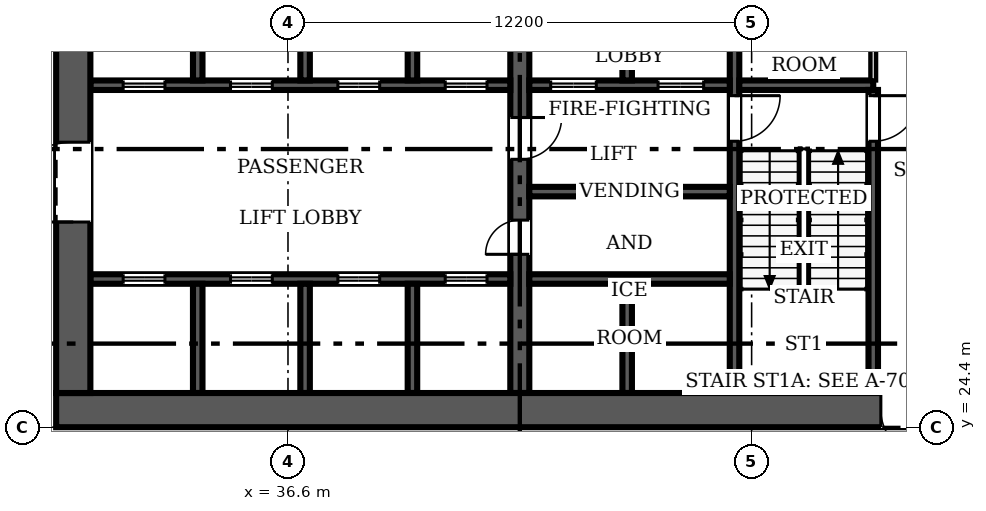
"""IFC4 building model, lengths in metres.
Left out: names, types, materials, properties, quantities, classifications, styles, units other than length and angle.
Written with IfcOpenShell. Run it as: python <this file> out.ifc"""

import sys

from ifc_helpers import new_model, si_unit, direction, frame, frame_2d, origin, place, context, subcontext, project, spatial, rectangle, extrude, source, transform, mapped, element, fill, save


model = new_model("IFC4")
c1 = context("Model", 3, precision=1e-05, world=origin(), true_north=direction((0.0, 1.0)))
c2 = subcontext(c1, "Body", "Model", "MODEL_VIEW")
j1 = project(units=[si_unit("LENGTHUNIT", "METRE"), si_unit("PLANEANGLEUNIT", "RADIAN")], contexts=[c1])
p1 = place(None, origin())
s1 = spatial("IfcSite", under=j1, at=p1, CompositionType="ELEMENT")
p2 = place(p1, origin())
s2 = spatial("IfcBuilding", under=s1, at=p2, CompositionType="ELEMENT")
p3 = place(p2, frame((0.0, 0.0, 7.2)))
s3 = spatial("IfcBuildingStorey", under=s2, at=p3, CompositionType="ELEMENT", Elevation=7.2)
p4 = place(p3, frame((54.9, 24.85, 0.0), z_axis=(0.0, 0.0, 1.0), x_axis=(-1.0, 0.0, 0.0)))
e1 = element("IfcWall", 1, at=p4, inside=s3, PredefinedType="SHEAR", context=c2, shape_type="SweptSolid", body=[
    extrude(rectangle(XDim=24.4, YDim=0.9, at=frame_2d((12.2, 0.0))), origin(), (0.0, 0.0, 1.0), 4.8),
])
m1 = source(origin(), c2, "Body", "SweptSolid", [
    extrude(rectangle(XDim=1.2, YDim=2.1, at=frame_2d((0.6, 1.05))), frame((0.0, 0.46, 0.0), z_axis=(0.0, -1.0, 0.0), x_axis=(1.0, 0.0, 0.0)), (0.0, 0.0, 1.0), 0.92),
])
p5 = place(p4, frame((1.5, 0.0, 0.0)))
e2 = element("IfcOpeningElement", 2, at=p5, cuts=e1, PredefinedType="OPENING", context=c2, shape_type="MappedRepresentation", body=[
    mapped(m1, transform((0.0, 0.0, 0.0), scale=1.0)),
])
p6 = place(p3, frame((30.95, 25.3, 0.0), z_axis=(0.0, 0.0, 1.0), x_axis=(0.0, 1.0, 0.0)))
e3 = element("IfcWall", 3, at=p6, inside=s3, PredefinedType="SHEAR", context=c2, shape_type="SweptSolid", body=[
    extrude(rectangle(XDim=22.6, YDim=0.9, at=frame_2d((11.3, 0.0))), origin(), (0.0, 0.0, 1.0), 4.8),
])
m2 = source(origin(), c2, "Body", "SweptSolid", [
    extrude(rectangle(XDim=2.1, YDim=2.4, at=frame_2d((1.05, 1.2))), frame((0.0, 0.46, 0.0), z_axis=(0.0, -1.0, 0.0), x_axis=(1.0, 0.0, 0.0)), (0.0, 0.0, 1.0), 0.92),
])
p7 = place(p6, frame((4.5, 0.0, 0.0)))
e4 = element("IfcOpeningElement", 4, at=p7, cuts=e3, PredefinedType="OPENING", context=c2, shape_type="MappedRepresentation", body=[
    mapped(m2, transform((0.0, 0.0, 0.0), scale=1.0)),
])
p8 = place(p6, frame((16.0, 0.0, 0.0)))
e5 = element("IfcOpeningElement", 5, at=p8, cuts=e3, PredefinedType="OPENING", context=c2, shape_type="MappedRepresentation", body=[
    mapped(m2, transform((0.0, 0.0, 0.0), scale=1.0)),
])
p9 = place(p3, frame((42.7, 36.35, 0.0), z_axis=(0.0, 0.0, 1.0), x_axis=(0.0, -1.0, 0.0)))
e6 = element("IfcWall", 6, at=p9, inside=s3, PredefinedType="SHEAR", context=c2, shape_type="SweptSolid", body=[
    extrude(rectangle(XDim=11.05, YDim=0.5, at=frame_2d((5.525, 0.0))), origin(), (0.0, 0.0, 1.0), 4.8),
])
m3 = source(origin(), c2, "Body", "SweptSolid", [
    extrude(rectangle(XDim=0.9, YDim=2.1, at=frame_2d((0.45, 1.05))), frame((0.0, 0.26, 0.0), z_axis=(0.0, -1.0, 0.0), x_axis=(1.0, 0.0, 0.0)), (0.0, 0.0, 1.0), 0.52),
])
p10 = place(p9, frame((6.5, 0.0, 0.0)))
e7 = element("IfcOpeningElement", 7, at=p10, cuts=e6, PredefinedType="OPENING", context=c2, shape_type="MappedRepresentation", body=[
    mapped(m3, transform((0.0, 0.0, 0.0), scale=1.0)),
])
m4 = source(origin(), c2, "Body", "SweptSolid", [
    extrude(rectangle(XDim=1.1, YDim=2.1, at=frame_2d((0.55, 1.05))), frame((0.0, 0.26, 0.0), z_axis=(0.0, -1.0, 0.0), x_axis=(1.0, 0.0, 0.0)), (0.0, 0.0, 1.0), 0.52),
])
p11 = place(p9, frame((3.8, 0.0, 0.0)))
e8 = element("IfcOpeningElement", 8, at=p11, cuts=e6, PredefinedType="OPENING", context=c2, shape_type="MappedRepresentation", body=[
    mapped(m4, transform((0.0, 0.0, 0.0), scale=1.0)),
])
p12 = place(p3, frame((48.35, 36.35, 0.0), z_axis=(0.0, 0.0, 1.0), x_axis=(0.0, -1.0, 0.0)))
e9 = element("IfcWall", 9, at=p12, inside=s3, PredefinedType="SOLIDWALL", context=c2, shape_type="SweptSolid", body=[
    extrude(rectangle(XDim=11.05, YDim=0.25, at=frame_2d((5.525, 0.0))), origin(), (0.0, 0.0, 1.0), 4.8),
])
m5 = source(origin(), c2, "Body", "SweptSolid", [
    extrude(rectangle(XDim=1.2, YDim=2.1, at=frame_2d((0.6, 1.05))), frame((0.0, 0.135, 0.0), z_axis=(0.0, -1.0, 0.0), x_axis=(1.0, 0.0, 0.0)), (0.0, 0.0, 1.0), 0.27),
])
p13 = place(p12, frame((3.225, 0.0, 0.0)))
e10 = element("IfcOpeningElement", 10, at=p13, cuts=e9, PredefinedType="OPENING", context=c2, shape_type="MappedRepresentation", body=[
    mapped(m5, transform((0.0, 0.0, 0.0), scale=1.0)),
])
p14 = place(p3, frame((42.45, 33.4, 0.0), z_axis=(0.0, 0.0, 1.0), x_axis=(-1.0, 0.0, 0.0)))
e11 = element("IfcWall", 11, at=p14, inside=s3, PredefinedType="SOLIDWALL", context=c2, shape_type="SweptSolid", body=[
    extrude(rectangle(XDim=11.05, YDim=0.25, at=frame_2d((5.525, 0.0))), origin(), (0.0, 0.0, 1.0), 4.8),
])
m6 = source(origin(), c2, "Body", "SweptSolid", [
    extrude(rectangle(XDim=1.1, YDim=2.1, at=frame_2d((0.55, 1.05))), frame((0.0, 0.135, 0.0), z_axis=(0.0, -1.0, 0.0), x_axis=(1.0, 0.0, 0.0)), (0.0, 0.0, 1.0), 0.27),
])
p15 = place(p14, frame((9.087, 0.0, 0.0)))
e12 = element("IfcOpeningElement", 12, at=p15, cuts=e11, PredefinedType="OPENING", context=c2, shape_type="MappedRepresentation", body=[
    mapped(m6, transform((0.0, 0.0, 0.0), scale=1.0)),
])
p16 = place(p14, frame((6.262, 0.0, 0.0)))
e13 = element("IfcOpeningElement", 13, at=p16, cuts=e11, PredefinedType="OPENING", context=c2, shape_type="MappedRepresentation", body=[
    mapped(m6, transform((0.0, 0.0, 0.0), scale=1.0)),
])
p17 = place(p14, frame((3.438, 0.0, 0.0)))
e14 = element("IfcOpeningElement", 14, at=p17, cuts=e11, PredefinedType="OPENING", context=c2, shape_type="MappedRepresentation", body=[
    mapped(m6, transform((0.0, 0.0, 0.0), scale=1.0)),
])
p18 = place(p14, frame((0.613, 0.0, 0.0)))
e15 = element("IfcOpeningElement", 15, at=p18, cuts=e11, PredefinedType="OPENING", context=c2, shape_type="MappedRepresentation", body=[
    mapped(m6, transform((0.0, 0.0, 0.0), scale=1.0)),
])
p19 = place(p3, frame((48.225, 33.4, 0.0), z_axis=(0.0, 0.0, 1.0), x_axis=(-1.0, 0.0, 0.0)))
e16 = element("IfcWall", 16, at=p19, inside=s3, PredefinedType="SOLIDWALL", context=c2, shape_type="SweptSolid", body=[
    extrude(rectangle(XDim=5.275, YDim=0.25, at=frame_2d((2.638, 0.0))), origin(), (0.0, 0.0, 1.0), 4.8),
])
p20 = place(p19, frame((3.512, 0.0, 0.0)))
e17 = element("IfcOpeningElement", 17, at=p20, cuts=e16, PredefinedType="OPENING", context=c2, shape_type="MappedRepresentation", body=[
    mapped(m5, transform((0.0, 0.0, 0.0), scale=1.0)),
])
p21 = place(p19, frame((0.688, 0.0, 0.0)))
e18 = element("IfcOpeningElement", 18, at=p21, cuts=e16, PredefinedType="OPENING", context=c2, shape_type="MappedRepresentation", body=[
    mapped(m5, transform((0.0, 0.0, 0.0), scale=1.0)),
])
p22 = place(p3, frame((48.475, 33.4, 0.0), z_axis=(0.0, 0.0, 1.0), x_axis=(1.0, 0.0, 0.0)))
e19 = element("IfcWall", 19, at=p22, inside=s3, PredefinedType="SOLIDWALL", context=c2, shape_type="SweptSolid", body=[
    extrude(rectangle(XDim=3.525, YDim=0.25, at=frame_2d((1.762, 0.0))), origin(), (0.0, 0.0, 1.0), 4.8),
])
p23 = place(p3, frame((31.4, 28.3, 0.0), z_axis=(0.0, 0.0, 1.0), x_axis=(1.0, 0.0, 0.0)))
e20 = element("IfcWall", 20, at=p23, inside=s3, PredefinedType="SOLIDWALL", context=c2, shape_type="SweptSolid", body=[
    extrude(rectangle(XDim=11.05, YDim=0.25, at=frame_2d((5.525, 0.0))), origin(), (0.0, 0.0, 1.0), 4.8),
])
p24 = place(p23, frame((0.863, 0.0, 0.0)))
e21 = element("IfcOpeningElement", 21, at=p24, cuts=e20, PredefinedType="OPENING", context=c2, shape_type="MappedRepresentation", body=[
    mapped(m6, transform((0.0, 0.0, 0.0), scale=1.0)),
])
p25 = place(p23, frame((3.688, 0.0, 0.0)))
e22 = element("IfcOpeningElement", 22, at=p25, cuts=e20, PredefinedType="OPENING", context=c2, shape_type="MappedRepresentation", body=[
    mapped(m6, transform((0.0, 0.0, 0.0), scale=1.0)),
])
p26 = place(p23, frame((6.512, 0.0, 0.0)))
e23 = element("IfcOpeningElement", 23, at=p26, cuts=e20, PredefinedType="OPENING", context=c2, shape_type="MappedRepresentation", body=[
    mapped(m6, transform((0.0, 0.0, 0.0), scale=1.0)),
])
p27 = place(p23, frame((9.337, 0.0, 0.0)))
e24 = element("IfcOpeningElement", 24, at=p27, cuts=e20, PredefinedType="OPENING", context=c2, shape_type="MappedRepresentation", body=[
    mapped(m6, transform((0.0, 0.0, 0.0), scale=1.0)),
])
p28 = place(p3, frame((42.95, 28.3, 0.0), z_axis=(0.0, 0.0, 1.0), x_axis=(1.0, 0.0, 0.0)))
e25 = element("IfcWall", 25, at=p28, inside=s3, PredefinedType="SOLIDWALL", context=c2, shape_type="SweptSolid", body=[
    extrude(rectangle(XDim=5.275, YDim=0.25, at=frame_2d((2.638, 0.0))), origin(), (0.0, 0.0, 1.0), 4.8),
])
p29 = place(p3, frame((52.0, 25.3, 0.0), z_axis=(0.0, 0.0, 1.0), x_axis=(0.0, 1.0, 0.0)))
e26 = element("IfcWall", 26, at=p29, inside=s3, PredefinedType="SOLIDWALL", context=c2, shape_type="SweptSolid", body=[
    extrude(rectangle(XDim=7.975, YDim=0.25, at=frame_2d((3.987, 0.0))), origin(), (0.0, 0.0, 1.0), 4.8),
])
p30 = place(p29, frame((6.625, 0.0, 0.0)))
e27 = element("IfcOpeningElement", 27, at=p30, cuts=e26, PredefinedType="OPENING", context=c2, shape_type="MappedRepresentation", body=[
    mapped(m5, transform((0.0, 0.0, 0.0), scale=1.0)),
])
p31 = place(p3, frame((45.525, 33.525, 0.0), z_axis=(0.0, 0.0, 1.0), x_axis=(0.0, 1.0, 0.0)))
e28 = element("IfcWall", 28, at=p31, inside=s3, PredefinedType="SOLIDWALL", context=c2, shape_type="SweptSolid", body=[
    extrude(rectangle(XDim=2.825, YDim=0.25, at=frame_2d((1.413, 0.0))), origin(), (0.0, 0.0, 1.0), 4.8),
])
p32 = place(p3, frame((42.95, 30.6, 0.0), z_axis=(0.0, 0.0, 1.0), x_axis=(1.0, 0.0, 0.0)))
e29 = element("IfcWall", 29, at=p32, inside=s3, PredefinedType="SOLIDWALL", context=c2, shape_type="SweptSolid", body=[
    extrude(rectangle(XDim=5.275, YDim=0.25, at=frame_2d((2.638, 0.0))), origin(), (0.0, 0.0, 1.0), 4.8),
])
for number, where, z_axis, x_axis in (
    (30, (34.225, 33.525, 0.0), (0.0, 0.0, 1.0), (0.0, 1.0, 0.0)),
    (31, (37.05, 33.525, 0.0), (0.0, 0.0, 1.0), (0.0, 1.0, 0.0)),
    (32, (39.875, 33.525, 0.0), (0.0, 0.0, 1.0), (0.0, 1.0, 0.0)),
):
    element("IfcWall", number, at=place(p3, frame(where, z_axis=z_axis, x_axis=x_axis)), inside=s3, PredefinedType="SOLIDWALL", context=c2, shape_type="SweptSolid", body=[
        extrude(rectangle(XDim=2.825, YDim=0.25, at=frame_2d((1.413, 0.0))), origin(), (0.0, 0.0, 1.0), 4.8),
    ])
for number, where, z_axis, x_axis in (
    (33, (34.225, 25.3, 0.0), (0.0, 0.0, 1.0), (0.0, 1.0, 0.0)),
    (34, (37.05, 25.3, 0.0), (0.0, 0.0, 1.0), (0.0, 1.0, 0.0)),
    (35, (39.875, 25.3, 0.0), (0.0, 0.0, 1.0), (0.0, 1.0, 0.0)),
    (36, (45.525, 25.3, 0.0), (0.0, 0.0, 1.0), (0.0, 1.0, 0.0)),
):
    element("IfcWall", number, at=place(p3, frame(where, z_axis=z_axis, x_axis=x_axis)), inside=s3, PredefinedType="SOLIDWALL", context=c2, shape_type="SweptSolid", body=[
        extrude(rectangle(XDim=2.875, YDim=0.25, at=frame_2d((1.438, 0.0))), origin(), (0.0, 0.0, 1.0), 4.8),
    ])
p33 = place(p3, frame((52.0, 33.525, 0.0), z_axis=(0.0, 0.0, 1.0), x_axis=(0.0, 1.0, 0.0)))
e37 = element("IfcWall", 37, at=p33, inside=s3, PredefinedType="PARTITIONING", context=c2, shape_type="SweptSolid", body=[
    extrude(rectangle(XDim=6.15, YDim=0.15, at=frame_2d((3.075, 0.0))), origin(), (0.0, 0.0, 1.0), 4.55),
])
m7 = source(origin(), c2, "Body", "SweptSolid", [
    extrude(rectangle(XDim=0.9, YDim=2.1, at=frame_2d((0.45, 1.05))), frame((0.0, 0.085, 0.0), z_axis=(0.0, -1.0, 0.0), x_axis=(1.0, 0.0, 0.0)), (0.0, 0.0, 1.0), 0.17),
])
p34 = place(p33, frame((1.025, 0.0, 0.0)))
e38 = element("IfcOpeningElement", 38, at=p34, cuts=e37, PredefinedType="OPENING", context=c2, shape_type="MappedRepresentation", body=[
    mapped(m7, transform((0.0, 0.0, 0.0), scale=1.0)),
])
m8 = source(origin(), c2, "Body", "SweptSolid", [
    extrude(rectangle(XDim=1.2, YDim=2.1, at=frame_2d((0.6, 1.05))), frame((0.0, 0.025, 0.0), z_axis=(0.0, -1.0, 0.0), x_axis=(1.0, 0.0, 0.0)), (0.0, 0.0, 1.0), 0.05),
])
p35 = place(p5, origin())
e39 = element("IfcDoor", 39, at=p35, inside=s3, OperationType="SINGLE_SWING_LEFT", PredefinedType="DOOR", context=c2, shape_type="MappedRepresentation", body=[
    mapped(m8, transform((0.0, 0.0, 0.0), scale=1.0)),
])
fill(e2, e39)
m9 = source(origin(), c2, "Body", "SweptSolid", [
    extrude(rectangle(XDim=2.1, YDim=2.4, at=frame_2d((1.05, 1.2))), frame((0.0, 0.025, 0.0), z_axis=(0.0, -1.0, 0.0), x_axis=(1.0, 0.0, 0.0)), (0.0, 0.0, 1.0), 0.05),
])
p36 = place(p7, origin())
e40 = element("IfcDoor", 40, at=p36, inside=s3, OperationType="DOUBLE_DOOR_SINGLE_SWING", PredefinedType="DOOR", context=c2, shape_type="MappedRepresentation", body=[
    mapped(m9, transform((0.0, 0.0, 0.0), scale=1.0)),
])
fill(e4, e40)
m10 = source(origin(), c2, "Body", "SweptSolid", [
    extrude(rectangle(XDim=0.9, YDim=2.1, at=frame_2d((0.45, 1.05))), frame((0.0, 0.025, 0.0), z_axis=(0.0, -1.0, 0.0), x_axis=(1.0, 0.0, 0.0)), (0.0, 0.0, 1.0), 0.05),
])
p37 = place(p10, origin())
e41 = element("IfcDoor", 41, at=p37, inside=s3, OperationType="SINGLE_SWING_RIGHT", PredefinedType="DOOR", context=c2, shape_type="MappedRepresentation", body=[
    mapped(m10, transform((0.0, 0.0, 0.0), scale=1.0)),
])
fill(e7, e41)
m11 = source(origin(), c2, "Body", "SweptSolid", [
    extrude(rectangle(XDim=1.1, YDim=2.1, at=frame_2d((0.55, 1.05))), frame((0.0, 0.025, 0.0), z_axis=(0.0, -1.0, 0.0), x_axis=(1.0, 0.0, 0.0)), (0.0, 0.0, 1.0), 0.05),
])
p38 = place(p11, origin())
e42 = element("IfcDoor", 42, at=p38, inside=s3, OperationType="SINGLE_SWING_LEFT", PredefinedType="DOOR", context=c2, shape_type="MappedRepresentation", body=[
    mapped(m11, transform((0.0, 0.0, 0.0), scale=1.0)),
])
fill(e8, e42)
p39 = place(p13, origin())
e43 = element("IfcDoor", 43, at=p39, inside=s3, OperationType="SINGLE_SWING_LEFT", PredefinedType="DOOR", context=c2, shape_type="MappedRepresentation", body=[
    mapped(m8, transform((0.0, 0.0, 0.0), scale=1.0)),
])
fill(e10, e43)
p40 = place(p15, origin())
e44 = element("IfcDoor", 44, at=p40, inside=s3, OperationType="DOUBLE_DOOR_SLIDING", PredefinedType="DOOR", context=c2, shape_type="MappedRepresentation", body=[
    mapped(m11, transform((0.0, 0.0, 0.0), scale=1.0)),
])
fill(e12, e44)
p41 = place(p16, origin())
e45 = element("IfcDoor", 45, at=p41, inside=s3, OperationType="DOUBLE_DOOR_SLIDING", PredefinedType="DOOR", context=c2, shape_type="MappedRepresentation", body=[
    mapped(m11, transform((0.0, 0.0, 0.0), scale=1.0)),
])
fill(e13, e45)
p42 = place(p17, origin())
e46 = element("IfcDoor", 46, at=p42, inside=s3, OperationType="DOUBLE_DOOR_SLIDING", PredefinedType="DOOR", context=c2, shape_type="MappedRepresentation", body=[
    mapped(m11, transform((0.0, 0.0, 0.0), scale=1.0)),
])
fill(e14, e46)
p43 = place(p18, origin())
e47 = element("IfcDoor", 47, at=p43, inside=s3, OperationType="DOUBLE_DOOR_SLIDING", PredefinedType="DOOR", context=c2, shape_type="MappedRepresentation", body=[
    mapped(m11, transform((0.0, 0.0, 0.0), scale=1.0)),
])
fill(e15, e47)
p44 = place(p20, origin())
e48 = element("IfcDoor", 48, at=p44, inside=s3, OperationType="DOUBLE_DOOR_SLIDING", PredefinedType="DOOR", context=c2, shape_type="MappedRepresentation", body=[
    mapped(m8, transform((0.0, 0.0, 0.0), scale=1.0)),
])
fill(e17, e48)
p45 = place(p21, origin())
e49 = element("IfcDoor", 49, at=p45, inside=s3, OperationType="DOUBLE_DOOR_SLIDING", PredefinedType="DOOR", context=c2, shape_type="MappedRepresentation", body=[
    mapped(m8, transform((0.0, 0.0, 0.0), scale=1.0)),
])
fill(e18, e49)
p46 = place(p24, origin())
e50 = element("IfcDoor", 50, at=p46, inside=s3, OperationType="DOUBLE_DOOR_SLIDING", PredefinedType="DOOR", context=c2, shape_type="MappedRepresentation", body=[
    mapped(m11, transform((0.0, 0.0, 0.0), scale=1.0)),
])
fill(e21, e50)
p47 = place(p25, origin())
e51 = element("IfcDoor", 51, at=p47, inside=s3, OperationType="DOUBLE_DOOR_SLIDING", PredefinedType="DOOR", context=c2, shape_type="MappedRepresentation", body=[
    mapped(m11, transform((0.0, 0.0, 0.0), scale=1.0)),
])
fill(e22, e51)
p48 = place(p26, origin())
e52 = element("IfcDoor", 52, at=p48, inside=s3, OperationType="DOUBLE_DOOR_SLIDING", PredefinedType="DOOR", context=c2, shape_type="MappedRepresentation", body=[
    mapped(m11, transform((0.0, 0.0, 0.0), scale=1.0)),
])
fill(e23, e52)
p49 = place(p27, origin())
e53 = element("IfcDoor", 53, at=p49, inside=s3, OperationType="DOUBLE_DOOR_SLIDING", PredefinedType="DOOR", context=c2, shape_type="MappedRepresentation", body=[
    mapped(m11, transform((0.0, 0.0, 0.0), scale=1.0)),
])
fill(e24, e53)
p50 = place(p30, origin())
e54 = element("IfcDoor", 54, at=p50, inside=s3, OperationType="SINGLE_SWING_RIGHT", PredefinedType="DOOR", context=c2, shape_type="MappedRepresentation", body=[
    mapped(m8, transform((0.0, 0.0, 0.0), scale=1.0)),
])
fill(e27, e54)
save(model, sys.argv[1])
